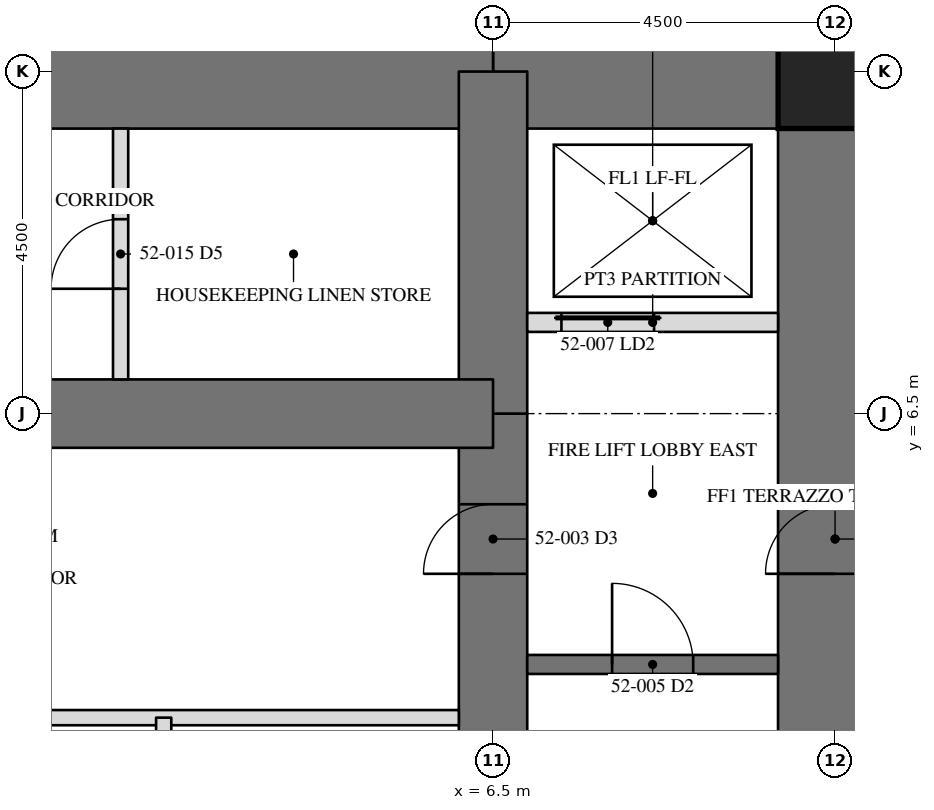
"""IFC4 building model, lengths in metres.
Left out: names, types, materials, properties, quantities, classifications, styles, units other than length and angle.
Written with IfcOpenShell. Run it as: python <this file> out.ifc"""

import sys

from ifc_helpers import new_model, si_unit, direction, frame, frame_2d, origin, origin_2d, place, context, subcontext, project, spatial, rectangle, hollow_rectangle, extrude, element, fill, save


model = new_model("IFC4")
c1 = context("Model", 3, precision=1e-05, world=origin(), true_north=direction((0.0, 1.0)))
c2 = subcontext(c1, "Body", "Model", "MODEL_VIEW")
j1 = project(units=[si_unit("LENGTHUNIT", "METRE"), si_unit("PLANEANGLEUNIT", "RADIAN")], contexts=[c1])
p1 = place(None, origin())
s1 = spatial("IfcSite", under=j1, at=p1, CompositionType="ELEMENT")
p2 = place(p1, origin())
s2 = spatial("IfcBuilding", under=s1, at=p2, CompositionType="ELEMENT")
p3 = place(p2, frame((0.0, 0.0, 218.7)))
s3 = spatial("IfcBuildingStorey", under=s2, at=p3, CompositionType="ELEMENT", Elevation=218.7)
p4 = place(p3, frame((11.0, -11.0, 0.0), z_axis=(0.0, 0.0, 1.0), x_axis=(0.0, 1.0, 0.0)))
e1 = element("IfcWall", 1, at=p4, inside=s3, PredefinedType="SHEAR", context=c2, shape_type="SweptSolid", body=[
    extrude(rectangle(XDim=22.0, YDim=1.5, at=frame_2d((11.0, 0.0))), origin(), (0.0, 0.0, 1.0), 3.5),
])
p5 = place(p4, frame((15.393, 0.0, 0.0)))
e2 = element("IfcOpeningElement", 2, at=p5, cuts=e1, PredefinedType="OPENING", context=c2, shape_type="SweptSolid", body=[
    extrude(rectangle(XDim=0.915, YDim=2.134, at=frame_2d((0.458, 1.067))), frame((0.0, 0.76, 0.0), z_axis=(0.0, -1.0, 0.0), x_axis=(1.0, 0.0, 0.0)), (0.0, 0.0, 1.0), 1.52),
])
p6 = place(p3, frame((11.0, 11.0, 0.0), z_axis=(0.0, 0.0, 1.0), x_axis=(-1.0, 0.0, 0.0)))
e3 = element("IfcWall", 3, at=p6, inside=s3, PredefinedType="SHEAR", context=c2, shape_type="SweptSolid", body=[
    extrude(rectangle(XDim=4.5, YDim=1.5, at=frame_2d((2.25, 0.0))), origin(), (0.0, 0.0, 1.0), 3.5),
])
p7 = place(p3, frame((6.5, 11.0, 0.0), z_axis=(0.0, 0.0, 1.0), x_axis=(-1.0, 0.0, 0.0)))
e4 = element("IfcWall", 4, at=p7, inside=s3, PredefinedType="SHEAR", context=c2, shape_type="SweptSolid", body=[
    extrude(rectangle(XDim=13.0, YDim=1.5, at=frame_2d((6.5, 0.0))), origin(), (0.0, 0.0, 1.0), 3.5),
])
p8 = place(p7, frame((6.042, 0.0, 0.0)))
e5 = element("IfcOpeningElement", 5, at=p8, cuts=e4, PredefinedType="OPENING", context=c2, shape_type="SweptSolid", body=[
    extrude(rectangle(XDim=0.915, YDim=2.134, at=frame_2d((0.458, 1.067))), frame((0.0, 0.76, 0.0), z_axis=(0.0, -1.0, 0.0), x_axis=(1.0, 0.0, 0.0)), (0.0, 0.0, 1.0), 1.52),
])
p9 = place(p3, frame((6.5, -6.5, 0.0), z_axis=(0.0, 0.0, 1.0), x_axis=(0.0, 1.0, 0.0)))
e6 = element("IfcWall", 6, at=p9, inside=s3, PredefinedType="SHEAR", context=c2, shape_type="SweptSolid", body=[
    extrude(rectangle(XDim=13.0, YDim=0.9, at=frame_2d((6.5, 0.0))), origin(), (0.0, 0.0, 1.0), 3.5),
])
p10 = place(p9, frame((10.893, 0.0, 0.0)))
e7 = element("IfcOpeningElement", 7, at=p10, cuts=e6, PredefinedType="OPENING", context=c2, shape_type="SweptSolid", body=[
    extrude(rectangle(XDim=0.915, YDim=2.134, at=frame_2d((0.458, 1.067))), frame((0.0, 0.46, 0.0), z_axis=(0.0, -1.0, 0.0), x_axis=(1.0, 0.0, 0.0)), (0.0, 0.0, 1.0), 0.92),
])
p11 = place(p9, frame((0.61, 0.0, 0.0)))
e8 = element("IfcOpeningElement", 8, at=p11, cuts=e6, PredefinedType="OPENING", context=c2, shape_type="SweptSolid", body=[
    extrude(rectangle(XDim=0.915, YDim=2.134, at=frame_2d((0.458, 1.067))), frame((0.0, 0.46, 0.0), z_axis=(0.0, -1.0, 0.0), x_axis=(1.0, 0.0, 0.0)), (0.0, 0.0, 1.0), 0.92),
])
p12 = place(p3, frame((6.5, 6.5, 0.0), z_axis=(0.0, 0.0, 1.0), x_axis=(0.0, 1.0, 0.0)))
e9 = element("IfcWall", 9, at=p12, inside=s3, PredefinedType="SHEAR", context=c2, shape_type="SweptSolid", body=[
    extrude(rectangle(XDim=4.5, YDim=0.9, at=frame_2d((2.25, 0.0))), origin(), (0.0, 0.0, 1.0), 3.5),
])
p13 = place(p3, frame((6.5, 6.5, 0.0), z_axis=(0.0, 0.0, 1.0), x_axis=(-1.0, 0.0, 0.0)))
e10 = element("IfcWall", 10, at=p13, inside=s3, PredefinedType="SHEAR", context=c2, shape_type="SweptSolid", body=[
    extrude(rectangle(XDim=13.0, YDim=0.9, at=frame_2d((6.5, 0.0))), origin(), (0.0, 0.0, 1.0), 3.5),
])
p14 = place(p3, frame((11.0, 11.0, 0.0), z_axis=(0.0, 0.0, 1.0), x_axis=(1.0, 0.0, 0.0)))
e11 = element("IfcColumn", 11, at=p14, inside=s3, PredefinedType="COLUMN", context=c2, shape_type="SweptSolid", body=[
    extrude(hollow_rectangle(XDim=1.499, YDim=1.499, WallThickness=0.102, at=origin_2d()), origin(), (0.0, 0.0, 1.0), 3.5),
])
p15 = place(p3, frame((6.95, 3.2, 0.0), z_axis=(0.0, 0.0, 1.0), x_axis=(1.0, 0.0, 0.0)))
e12 = element("IfcWall", 12, at=p15, inside=s3, PredefinedType="SOLIDWALL", context=c2, shape_type="SweptSolid", body=[
    extrude(rectangle(XDim=3.3, YDim=0.25, at=frame_2d((1.65, 0.0))), origin(), (0.0, 0.0, 1.0), 3.31),
])
p16 = place(p15, frame((1.116, 0.0, 0.0)))
e13 = element("IfcOpeningElement", 13, at=p16, cuts=e12, PredefinedType="OPENING", context=c2, shape_type="SweptSolid", body=[
    extrude(rectangle(XDim=1.067, YDim=2.134, at=frame_2d((0.533, 1.067))), frame((0.0, 0.135, 0.0), z_axis=(0.0, -1.0, 0.0), x_axis=(1.0, 0.0, 0.0)), (0.0, 0.0, 1.0), 0.27),
])
p17 = place(p3, frame((6.95, 7.7, 0.0), z_axis=(0.0, 0.0, 1.0), x_axis=(1.0, 0.0, 0.0)))
e14 = element("IfcWall", 14, at=p17, inside=s3, PredefinedType="PARTITIONING", context=c2, shape_type="SweptSolid", body=[
    extrude(rectangle(XDim=3.3, YDim=0.25, at=frame_2d((1.65, 0.0))), origin(), (0.0, 0.0, 1.0), 3.31),
])
p18 = place(p17, frame((0.45, 0.0, 0.0)))
e15 = element("IfcOpeningElement", 15, at=p18, cuts=e14, PredefinedType="OPENING", context=c2, shape_type="SweptSolid", body=[
    extrude(rectangle(XDim=1.219, YDim=2.134, at=frame_2d((0.609, 1.067))), frame((0.0, 0.135, 0.0), z_axis=(0.0, -1.0, 0.0), x_axis=(1.0, 0.0, 0.0)), (0.0, 0.0, 1.0), 0.27),
])
p19 = place(p3, frame((-6.05, 2.5, 0.0), z_axis=(0.0, 0.0, 1.0), x_axis=(1.0, 0.0, 0.0)))
e16 = element("IfcWall", 16, at=p19, inside=s3, PredefinedType="PARTITIONING", context=c2, shape_type="SweptSolid", body=[
    extrude(rectangle(XDim=12.1, YDim=0.2, at=frame_2d((6.05, 0.0))), origin(), (0.0, 0.0, 1.0), 3.31),
])
p20 = place(p3, frame((2.167, -2.5, 0.0), z_axis=(0.0, 0.0, 1.0), x_axis=(0.0, 1.0, 0.0)))
e17 = element("IfcWall", 17, at=p20, inside=s3, PredefinedType="PARTITIONING", context=c2, shape_type="SweptSolid", body=[
    extrude(rectangle(XDim=5.0, YDim=0.2, at=frame_2d((2.5, 0.0))), origin(), (0.0, 0.0, 1.0), 3.31),
])
p21 = place(p3, frame((1.6, 6.95, 0.0), z_axis=(0.0, 0.0, 1.0), x_axis=(0.0, 1.0, 0.0)))
e18 = element("IfcWall", 18, at=p21, inside=s3, PredefinedType="PARTITIONING", context=c2, shape_type="SweptSolid", body=[
    extrude(rectangle(XDim=3.3, YDim=0.2, at=frame_2d((1.65, 0.0))), origin(), (0.0, 0.0, 1.0), 3.31),
])
p22 = place(p21, frame((1.192, 0.0, 0.0)))
e19 = element("IfcOpeningElement", 19, at=p22, cuts=e18, PredefinedType="OPENING", context=c2, shape_type="SweptSolid", body=[
    extrude(rectangle(XDim=0.915, YDim=2.134, at=frame_2d((0.458, 1.067))), frame((0.0, 0.11, 0.0), z_axis=(0.0, -1.0, 0.0), x_axis=(1.0, 0.0, 0.0)), (0.0, 0.0, 1.0), 0.22),
])
p23 = place(p10, origin())
e20 = element("IfcDoor", 20, at=p23, inside=s3, OperationType="SINGLE_SWING_RIGHT", PredefinedType="DOOR", context=c2, shape_type="SweptSolid", body=[
    extrude(rectangle(XDim=0.915, YDim=2.134, at=frame_2d((0.458, 1.067))), frame((0.0, -0.375, 0.0), z_axis=(0.0, -1.0, 0.0), x_axis=(1.0, 0.0, 0.0)), (0.0, 0.0, 1.0), 0.05),
])
fill(e7, e20)
p24 = place(p16, origin())
e21 = element("IfcDoor", 21, at=p24, inside=s3, OperationType="SINGLE_SWING_LEFT", PredefinedType="DOOR", context=c2, shape_type="SweptSolid", body=[
    extrude(rectangle(XDim=1.067, YDim=2.134, at=frame_2d((0.533, 1.067))), frame((0.0, 0.025, 0.0), z_axis=(0.0, -1.0, 0.0), x_axis=(1.0, 0.0, 0.0)), (0.0, 0.0, 1.0), 0.05),
])
fill(e13, e21)
p25 = place(p18, origin())
e22 = element("IfcDoor", 22, at=p25, inside=s3, OperationType="SLIDING_TO_LEFT", PredefinedType="DOOR", context=c2, shape_type="SweptSolid", body=[
    extrude(rectangle(XDim=1.219, YDim=2.134, at=frame_2d((0.609, 1.067))), frame((0.0, 0.025, 0.0), z_axis=(0.0, -1.0, 0.0), x_axis=(1.0, 0.0, 0.0)), (0.0, 0.0, 1.0), 0.05),
])
fill(e15, e22)
p26 = place(p22, origin())
e23 = element("IfcDoor", 23, at=p26, inside=s3, OperationType="SINGLE_SWING_RIGHT", PredefinedType="DOOR", context=c2, shape_type="SweptSolid", body=[
    extrude(rectangle(XDim=0.915, YDim=2.134, at=frame_2d((0.458, 1.067))), frame((0.0, 0.025, 0.0), z_axis=(0.0, -1.0, 0.0), x_axis=(1.0, 0.0, 0.0)), (0.0, 0.0, 1.0), 0.05),
])
fill(e19, e23)
save(model, sys.argv[1])
